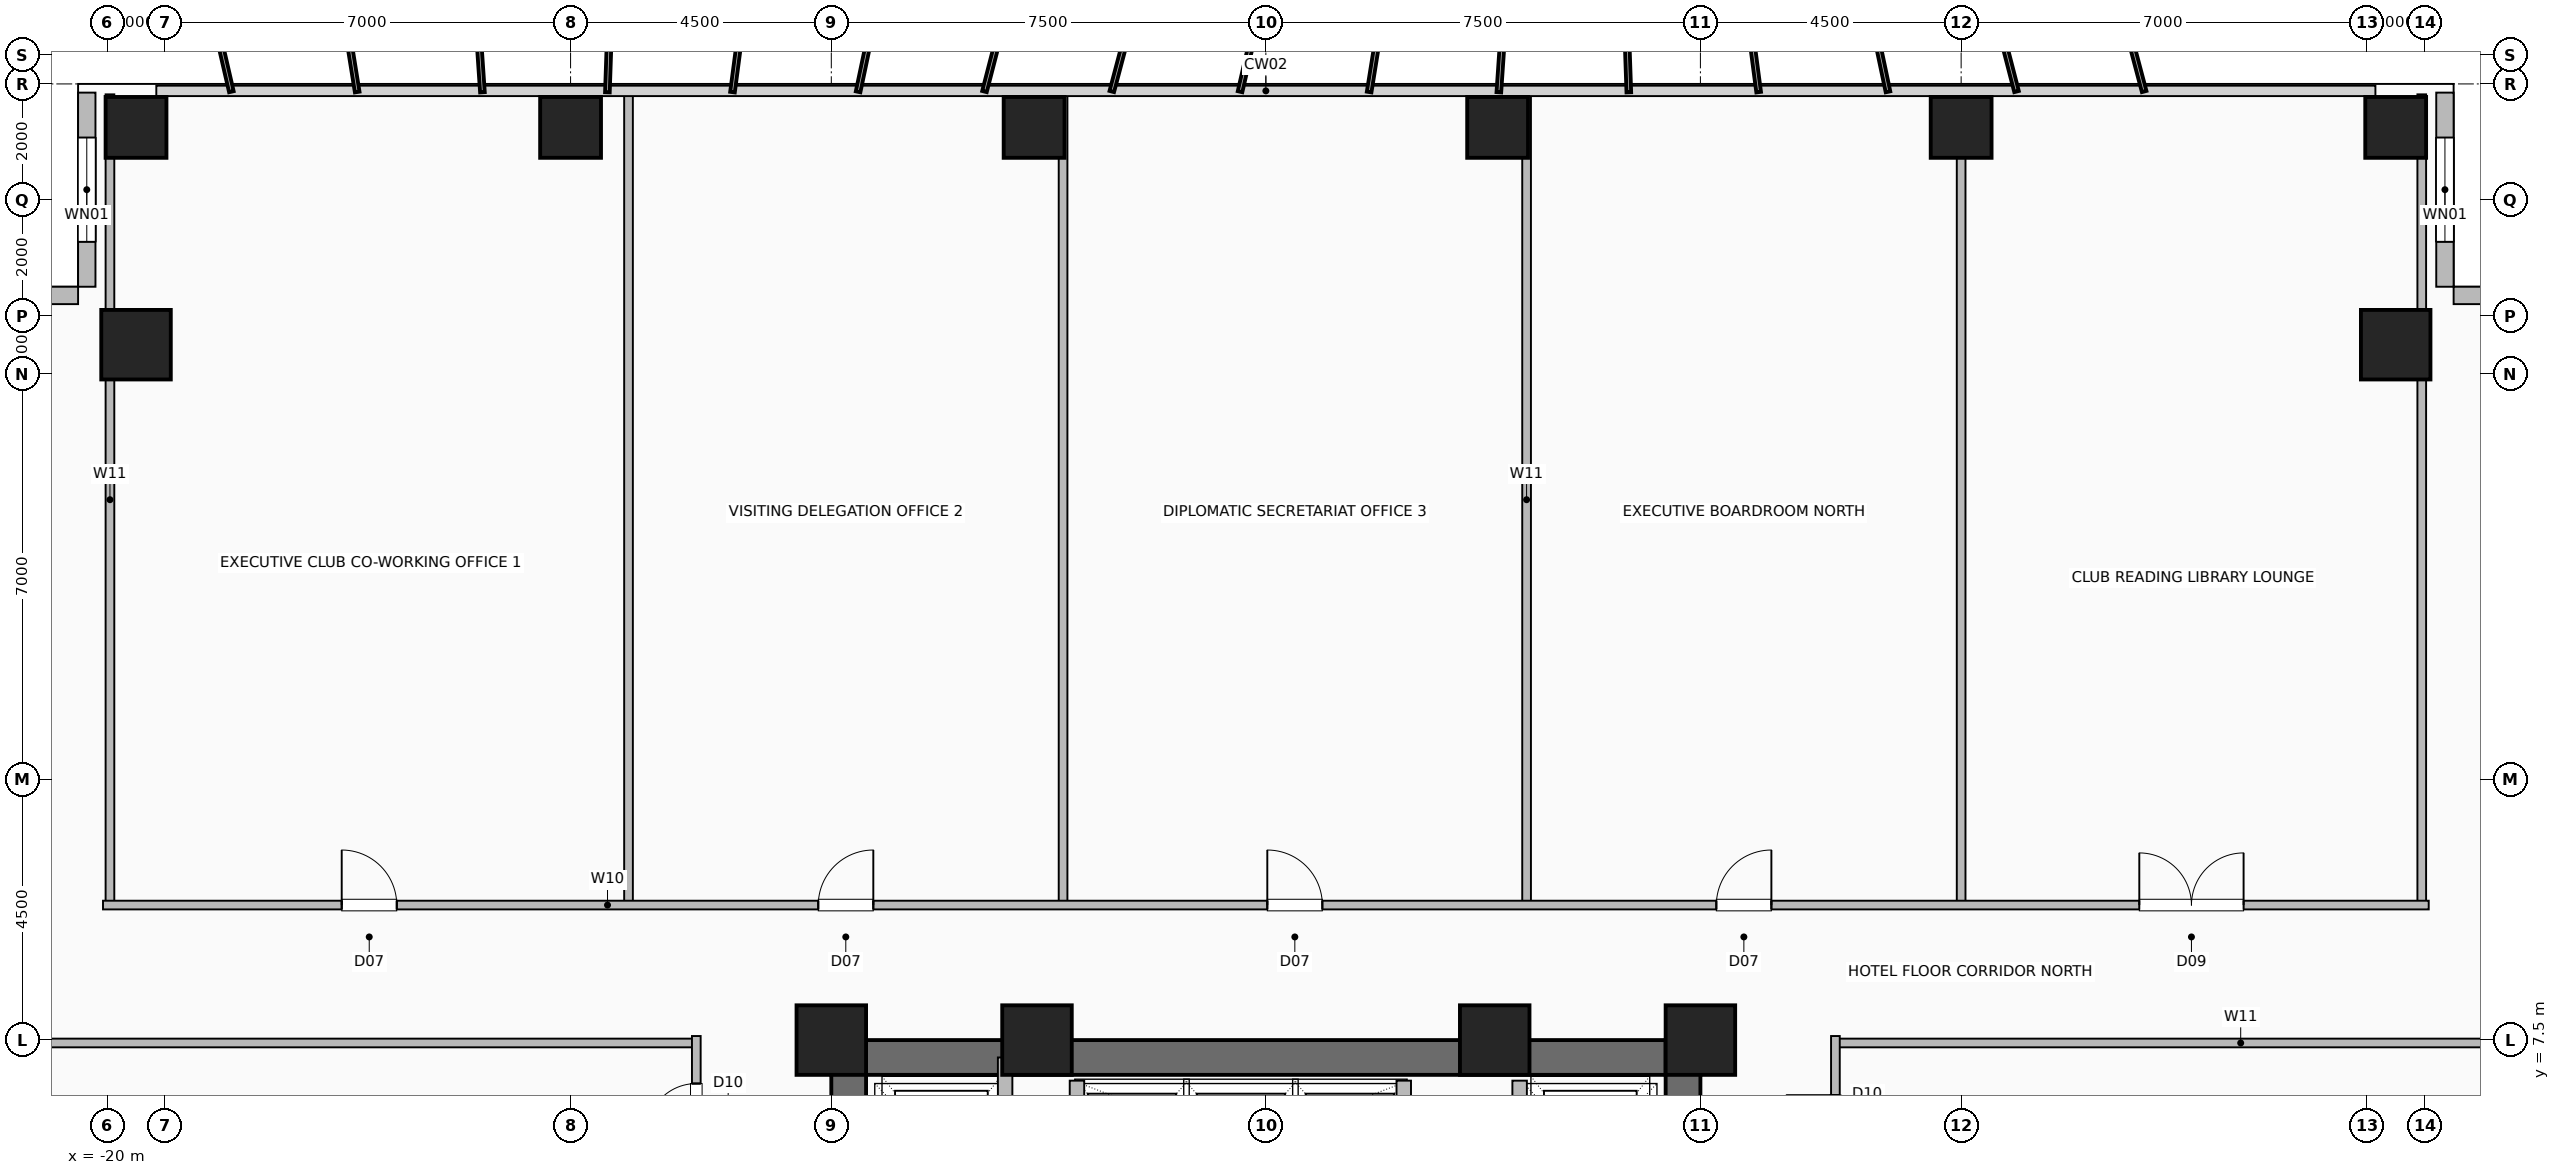
"""IFC4 building model, lengths in metres.
Left out: names, types, materials, properties, quantities, classifications, styles, units other than length and angle.
Written with IfcOpenShell. Run it as: python <this file> out.ifc"""

import sys

from ifc_helpers import new_model, si_unit, direction, frame, frame_2d, origin, origin_2d, place, context, subcontext, project, spatial, rectangle, hollow_rectangle, extrude, element, fill, save


model = new_model("IFC4")
c1 = context("Model", 3, precision=1e-05, world=origin(), true_north=direction((0.0, 1.0)))
c2 = subcontext(c1, "Body", "Model", "MODEL_VIEW")
j1 = project(units=[si_unit("LENGTHUNIT", "METRE"), si_unit("PLANEANGLEUNIT", "RADIAN")], contexts=[c1])
p1 = place(None, origin())
s1 = spatial("IfcSite", under=j1, at=p1, CompositionType="ELEMENT")
p2 = place(p1, origin())
s2 = spatial("IfcBuilding", under=s1, at=p2, CompositionType="ELEMENT")
p3 = place(p2, frame((0.0, 0.0, 58.5)))
s3 = spatial("IfcBuildingStorey", under=s2, at=p3, CompositionType="ELEMENT", Elevation=58.5)
for number, where, z_axis, x_axis in (
    (1, (7.5, 7.5, 0.0), (0.0, 0.0, 1.0), (1.0, 0.0, 0.0)),
    (2, (3.95, 7.5, 0.0), (0.0, 0.0, 1.0), (1.0, 0.0, 0.0)),
    (3, (-3.95, 7.5, 0.0), (0.0, 0.0, 1.0), (1.0, 0.0, 0.0)),
    (4, (-7.5, 7.5, 0.0), (0.0, 0.0, 1.0), (1.0, 0.0, 0.0)),
):
    element("IfcColumn", number, at=place(p3, frame(where, z_axis=z_axis, x_axis=x_axis)), inside=s3, PredefinedType="COLUMN", context=c2, shape_type="SweptSolid", body=[
        extrude(hollow_rectangle(XDim=1.2, YDim=1.2, WallThickness=0.055, at=origin_2d()), origin(), (0.0, 0.0, 1.0), 3.5),
    ])
for number, where, z_axis, x_axis in (
    (5, (-19.5, 23.25, 0.0), (0.0, 0.0, 1.0), (1.0, 0.0, 0.0)),
    (6, (-12.0, 23.25, 0.0), (0.0, 0.0, 1.0), (1.0, 0.0, 0.0)),
    (7, (-4.0, 23.25, 0.0), (0.0, 0.0, 1.0), (1.0, 0.0, 0.0)),
    (8, (4.0, 23.25, 0.0), (0.0, 0.0, 1.0), (1.0, 0.0, 0.0)),
    (9, (12.0, 23.25, 0.0), (0.0, 0.0, 1.0), (1.0, 0.0, 0.0)),
    (10, (19.5, 23.25, 0.0), (0.0, 0.0, 1.0), (1.0, 0.0, 0.0)),
):
    element("IfcColumn", number, at=place(p3, frame(where, z_axis=z_axis, x_axis=x_axis)), inside=s3, PredefinedType="COLUMN", context=c2, shape_type="SweptSolid", body=[
        extrude(hollow_rectangle(XDim=1.05, YDim=1.05, WallThickness=0.05, at=origin_2d()), origin(), (0.0, 0.0, 1.0), 3.5),
    ])
for number, where, z_axis, x_axis in (
    (11, (19.5, 19.5, 0.0), (0.0, 0.0, 1.0), (1.0, 0.0, 0.0)),
    (12, (-19.5, 19.5, 0.0), (0.0, 0.0, 1.0), (1.0, 0.0, 0.0)),
):
    element("IfcColumn", number, at=place(p3, frame(where, z_axis=z_axis, x_axis=x_axis)), inside=s3, PredefinedType="COLUMN", context=c2, shape_type="SweptSolid", body=[
        extrude(hollow_rectangle(XDim=1.2, YDim=1.2, WallThickness=0.055, at=origin_2d()), origin(), (0.0, 0.0, 1.0), 3.5),
    ])
p4 = place(p3, frame((20.35, 23.85, 0.0), z_axis=(0.0, 0.0, 1.0), x_axis=(0.0, -1.0, 0.0)))
e13 = element("IfcWall", 13, at=p4, inside=s3, PredefinedType="SOLIDWALL", context=c2, shape_type="SweptSolid", body=[
    extrude(rectangle(XDim=3.35, YDim=0.3, at=frame_2d((1.675, 0.0))), origin(), (0.0, 0.0, 1.0), 3.25),
])
p5 = place(p4, frame((0.775, 0.0, 0.9)))
e14 = element("IfcOpeningElement", 14, at=p5, cuts=e13, PredefinedType="OPENING", context=c2, shape_type="SweptSolid", body=[
    extrude(rectangle(XDim=1.8, YDim=1.8, at=frame_2d((0.9, 0.9))), frame((0.0, 0.16, 0.0), z_axis=(0.0, -1.0, 0.0), x_axis=(1.0, 0.0, 0.0)), (0.0, 0.0, 1.0), 0.32),
])
p6 = place(p3, frame((23.85, 20.35, 0.0), z_axis=(0.0, 0.0, 1.0), x_axis=(-1.0, 0.0, 0.0)))
e15 = element("IfcWall", 15, at=p6, inside=s3, PredefinedType="SOLIDWALL", context=c2, shape_type="SweptSolid", body=[
    extrude(rectangle(XDim=3.35, YDim=0.3, at=frame_2d((1.675, 0.0))), origin(), (0.0, 0.0, 1.0), 3.25),
])
p7 = place(p3, frame((-20.35, 23.85, 0.0), z_axis=(0.0, 0.0, 1.0), x_axis=(0.0, -1.0, 0.0)))
e16 = element("IfcWall", 16, at=p7, inside=s3, PredefinedType="SOLIDWALL", context=c2, shape_type="SweptSolid", body=[
    extrude(rectangle(XDim=3.35, YDim=0.3, at=frame_2d((1.675, 0.0))), origin(), (0.0, 0.0, 1.0), 3.25),
])
p8 = place(p7, frame((0.775, 0.0, 0.9)))
e17 = element("IfcOpeningElement", 17, at=p8, cuts=e16, PredefinedType="OPENING", context=c2, shape_type="SweptSolid", body=[
    extrude(rectangle(XDim=1.8, YDim=1.8, at=frame_2d((0.9, 0.9))), frame((0.0, 0.16, 0.0), z_axis=(0.0, -1.0, 0.0), x_axis=(1.0, 0.0, 0.0)), (0.0, 0.0, 1.0), 0.32),
])
p9 = place(p3, frame((-23.85, 20.35, 0.0), z_axis=(0.0, 0.0, 1.0), x_axis=(1.0, 0.0, 0.0)))
e18 = element("IfcWall", 18, at=p9, inside=s3, PredefinedType="SOLIDWALL", context=c2, shape_type="SweptSolid", body=[
    extrude(rectangle(XDim=3.35, YDim=0.3, at=frame_2d((1.675, 0.0))), origin(), (0.0, 0.0, 1.0), 3.25),
])
p10 = place(p3, frame((-7.5, 7.2, 0.0), z_axis=(0.0, 0.0, 1.0), x_axis=(1.0, 0.0, 0.0)))
e19 = element("IfcWall", 19, at=p10, inside=s3, PredefinedType="SHEAR", context=c2, shape_type="SweptSolid", body=[
    extrude(rectangle(XDim=15.0, YDim=0.6, at=frame_2d((7.5, 0.0))), origin(), (0.0, 0.0, 1.0), 3.25),
])
p11 = place(p3, frame((-7.2, -7.5, 0.0), z_axis=(0.0, 0.0, 1.0), x_axis=(0.0, 1.0, 0.0)))
e20 = element("IfcWall", 20, at=p11, inside=s3, PredefinedType="SHEAR", context=c2, shape_type="SweptSolid", body=[
    extrude(rectangle(XDim=15.0, YDim=0.6, at=frame_2d((7.5, 0.0))), origin(), (0.0, 0.0, 1.0), 3.25),
])
p12 = place(p11, frame((9.5, 0.0, 0.0)))
e21 = element("IfcOpeningElement", 21, at=p12, cuts=e20, PredefinedType="OPENING", context=c2, shape_type="SweptSolid", body=[
    extrude(rectangle(XDim=1.0, YDim=2.08, at=frame_2d((0.5, 1.04))), frame((0.0, 0.31, 0.0), z_axis=(0.0, -1.0, 0.0), x_axis=(1.0, 0.0, 0.0)), (0.0, 0.0, 1.0), 0.62),
])
p13 = place(p3, frame((7.2, -7.5, 0.0), z_axis=(0.0, 0.0, 1.0), x_axis=(0.0, 1.0, 0.0)))
e22 = element("IfcWall", 22, at=p13, inside=s3, PredefinedType="SHEAR", context=c2, shape_type="SweptSolid", body=[
    extrude(rectangle(XDim=15.0, YDim=0.6, at=frame_2d((7.5, 0.0))), origin(), (0.0, 0.0, 1.0), 3.25),
])
for number, where, z_axis, x_axis in (
    (23, (-3.26, 4.58, 0.0), (0.0, 0.0, 1.0), (0.0, 1.0, 0.0)),
    (24, (2.38, 4.58, 0.0), (0.0, 0.0, 1.0), (0.0, 1.0, 0.0)),
):
    element("IfcWall", number, at=place(p3, frame(where, z_axis=z_axis, x_axis=x_axis)), inside=s3, PredefinedType="SHEAR", context=c2, shape_type="SweptSolid", body=[
        extrude(rectangle(XDim=2.22, YDim=0.25, at=frame_2d((1.11, 0.0))), origin(), (0.0, 0.0, 1.0), 3.25),
    ])
p14 = place(p3, frame((-4.5, 4.35, 0.0), z_axis=(0.0, 0.0, 1.0), x_axis=(0.0, 1.0, 0.0)))
e25 = element("IfcWall", 25, at=p14, inside=s3, PredefinedType="SHEAR", context=c2, shape_type="SweptSolid", body=[
    extrude(rectangle(XDim=2.85, YDim=0.25, at=frame_2d((1.425, 0.0))), origin(), (0.0, 0.0, 1.0), 3.25),
])
p15 = place(p3, frame((4.38, 4.3, 0.0), z_axis=(0.0, 0.0, 1.0), x_axis=(0.0, 1.0, 0.0)))
e26 = element("IfcWall", 26, at=p15, inside=s3, PredefinedType="SHEAR", context=c2, shape_type="SweptSolid", body=[
    extrude(rectangle(XDim=2.5, YDim=0.25, at=frame_2d((1.25, 0.0))), origin(), (0.0, 0.0, 1.0), 3.25),
])
p16 = place(p15, frame((0.8, 0.0, 0.0)))
e27 = element("IfcOpeningElement", 27, at=p16, cuts=e26, PredefinedType="OPENING", context=c2, shape_type="SweptSolid", body=[
    extrude(rectangle(XDim=1.2, YDim=2.2, at=frame_2d((0.6, 1.1))), frame((0.0, 0.135, 0.0), z_axis=(0.0, -1.0, 0.0), x_axis=(1.0, 0.0, 0.0)), (0.0, 0.0, 1.0), 0.27),
])
for number, where, z_axis, x_axis in (
    (28, (-19.95, 9.83, 0.0), (0.0, 0.0, 1.0), (0.0, 1.0, 0.0)),
    (29, (-11.0, 9.83, 0.0), (0.0, 0.0, 1.0), (0.0, 1.0, 0.0)),
    (30, (-3.5, 9.83, 0.0), (0.0, 0.0, 1.0), (0.0, 1.0, 0.0)),
    (31, (4.5, 9.83, 0.0), (0.0, 0.0, 1.0), (0.0, 1.0, 0.0)),
    (32, (12.0, 9.83, 0.0), (0.0, 0.0, 1.0), (0.0, 1.0, 0.0)),
    (33, (19.95, 9.83, 0.0), (0.0, 0.0, 1.0), (0.0, 1.0, 0.0)),
):
    element("IfcWall", number, at=place(p3, frame(where, z_axis=z_axis, x_axis=x_axis)), inside=s3, PredefinedType="PARTITIONING", context=c2, shape_type="SweptSolid", body=[
        extrude(rectangle(XDim=13.99, YDim=0.15, at=frame_2d((6.995, 0.0))), origin(), (0.0, 0.0, 1.0), 3.25),
    ])
p17 = place(p3, frame((-20.07, 9.83, 0.0), z_axis=(0.0, 0.0, 1.0), x_axis=(1.0, 0.0, 0.0)))
e34 = element("IfcWall", 34, at=p17, inside=s3, PredefinedType="PARTITIONING", context=c2, shape_type="SweptSolid", body=[
    extrude(rectangle(XDim=40.14, YDim=0.15, at=frame_2d((20.07, 0.0))), origin(), (0.0, 0.0, 1.0), 3.25),
])
p18 = place(p17, frame((4.12, 0.0, 0.0)))
e35 = element("IfcOpeningElement", 35, at=p18, cuts=e34, PredefinedType="OPENING", context=c2, shape_type="SweptSolid", body=[
    extrude(rectangle(XDim=0.95, YDim=2.06, at=frame_2d((0.475, 1.03))), frame((0.0, 0.085, 0.0), z_axis=(0.0, -1.0, 0.0), x_axis=(1.0, 0.0, 0.0)), (0.0, 0.0, 1.0), 0.17),
])
p19 = place(p17, frame((12.345, 0.0, 0.0)))
e36 = element("IfcOpeningElement", 36, at=p19, cuts=e34, PredefinedType="OPENING", context=c2, shape_type="SweptSolid", body=[
    extrude(rectangle(XDim=0.95, YDim=2.06, at=frame_2d((0.475, 1.03))), frame((0.0, 0.085, 0.0), z_axis=(0.0, -1.0, 0.0), x_axis=(1.0, 0.0, 0.0)), (0.0, 0.0, 1.0), 0.17),
])
p20 = place(p17, frame((20.095, 0.0, 0.0)))
e37 = element("IfcOpeningElement", 37, at=p20, cuts=e34, PredefinedType="OPENING", context=c2, shape_type="SweptSolid", body=[
    extrude(rectangle(XDim=0.95, YDim=2.06, at=frame_2d((0.475, 1.03))), frame((0.0, 0.085, 0.0), z_axis=(0.0, -1.0, 0.0), x_axis=(1.0, 0.0, 0.0)), (0.0, 0.0, 1.0), 0.17),
])
p21 = place(p17, frame((27.845, 0.0, 0.0)))
e38 = element("IfcOpeningElement", 38, at=p21, cuts=e34, PredefinedType="OPENING", context=c2, shape_type="SweptSolid", body=[
    extrude(rectangle(XDim=0.95, YDim=2.06, at=frame_2d((0.475, 1.03))), frame((0.0, 0.085, 0.0), z_axis=(0.0, -1.0, 0.0), x_axis=(1.0, 0.0, 0.0)), (0.0, 0.0, 1.0), 0.17),
])
p22 = place(p17, frame((35.145, 0.0, 0.0)))
e39 = element("IfcOpeningElement", 39, at=p22, cuts=e34, PredefinedType="OPENING", context=c2, shape_type="SweptSolid", body=[
    extrude(rectangle(XDim=1.8, YDim=2.08, at=frame_2d((0.9, 1.04))), frame((0.0, 0.085, 0.0), z_axis=(0.0, -1.0, 0.0), x_axis=(1.0, 0.0, 0.0)), (0.0, 0.0, 1.0), 0.17),
])
p23 = place(p3, frame((-23.82, 7.45, 0.0), z_axis=(0.0, 0.0, 1.0), x_axis=(1.0, 0.0, 0.0)))
e40 = element("IfcWall", 40, at=p23, inside=s3, PredefinedType="PARTITIONING", context=c2, shape_type="SweptSolid", body=[
    extrude(rectangle(XDim=13.99, YDim=0.15, at=frame_2d((6.995, 0.0))), origin(), (0.0, 0.0, 1.0), 3.25),
])
p24 = place(p3, frame((-9.83, -7.57, 0.0), z_axis=(0.0, 0.0, 1.0), x_axis=(0.0, 1.0, 0.0)))
e41 = element("IfcWall", 41, at=p24, inside=s3, PredefinedType="PARTITIONING", context=c2, shape_type="SweptSolid", body=[
    extrude(rectangle(XDim=15.14, YDim=0.15, at=frame_2d((7.57, 0.0))), origin(), (0.0, 0.0, 1.0), 3.25),
])
p25 = place(p24, frame((2.62, 0.0, 0.0)))
e42 = element("IfcOpeningElement", 42, at=p25, cuts=e41, PredefinedType="OPENING", context=c2, shape_type="SweptSolid", body=[
    extrude(rectangle(XDim=0.95, YDim=2.06, at=frame_2d((0.475, 1.03))), frame((0.0, 0.085, 0.0), z_axis=(0.0, -1.0, 0.0), x_axis=(1.0, 0.0, 0.0)), (0.0, 0.0, 1.0), 0.17),
])
p26 = place(p24, frame((8.945, 0.0, 0.0)))
e43 = element("IfcOpeningElement", 43, at=p26, cuts=e41, PredefinedType="OPENING", context=c2, shape_type="SweptSolid", body=[
    extrude(rectangle(XDim=0.95, YDim=2.06, at=frame_2d((0.475, 1.03))), frame((0.0, 0.085, 0.0), z_axis=(0.0, -1.0, 0.0), x_axis=(1.0, 0.0, 0.0)), (0.0, 0.0, 1.0), 0.17),
])
p27 = place(p24, frame((13.47, 0.0, 0.0)))
e44 = element("IfcOpeningElement", 44, at=p27, cuts=e41, PredefinedType="OPENING", context=c2, shape_type="SweptSolid", body=[
    extrude(rectangle(XDim=0.85, YDim=2.05, at=frame_2d((0.425, 1.025))), frame((0.0, 0.085, 0.0), z_axis=(0.0, -1.0, 0.0), x_axis=(1.0, 0.0, 0.0)), (0.0, 0.0, 1.0), 0.17),
])
p28 = place(p3, frame((9.83, 7.45, 0.0), z_axis=(0.0, 0.0, 1.0), x_axis=(1.0, 0.0, 0.0)))
e45 = element("IfcWall", 45, at=p28, inside=s3, PredefinedType="PARTITIONING", context=c2, shape_type="SweptSolid", body=[
    extrude(rectangle(XDim=13.99, YDim=0.15, at=frame_2d((6.995, 0.0))), origin(), (0.0, 0.0, 1.0), 3.25),
])
p29 = place(p3, frame((9.83, -7.57, 0.0), z_axis=(0.0, 0.0, 1.0), x_axis=(0.0, 1.0, 0.0)))
e46 = element("IfcWall", 46, at=p29, inside=s3, PredefinedType="PARTITIONING", context=c2, shape_type="SweptSolid", body=[
    extrude(rectangle(XDim=15.14, YDim=0.15, at=frame_2d((7.57, 0.0))), origin(), (0.0, 0.0, 1.0), 3.25),
])
p30 = place(p29, frame((2.62, 0.0, 0.0)))
e47 = element("IfcOpeningElement", 47, at=p30, cuts=e46, PredefinedType="OPENING", context=c2, shape_type="SweptSolid", body=[
    extrude(rectangle(XDim=0.95, YDim=2.06, at=frame_2d((0.475, 1.03))), frame((0.0, 0.085, 0.0), z_axis=(0.0, -1.0, 0.0), x_axis=(1.0, 0.0, 0.0)), (0.0, 0.0, 1.0), 0.17),
])
p31 = place(p29, frame((8.745, 0.0, 0.0)))
e48 = element("IfcOpeningElement", 48, at=p31, cuts=e46, PredefinedType="OPENING", context=c2, shape_type="SweptSolid", body=[
    extrude(rectangle(XDim=0.95, YDim=2.06, at=frame_2d((0.475, 1.03))), frame((0.0, 0.085, 0.0), z_axis=(0.0, -1.0, 0.0), x_axis=(1.0, 0.0, 0.0)), (0.0, 0.0, 1.0), 0.17),
])
p32 = place(p29, frame((13.27, 0.0, 0.0)))
e49 = element("IfcOpeningElement", 49, at=p32, cuts=e46, PredefinedType="OPENING", context=c2, shape_type="SweptSolid", body=[
    extrude(rectangle(XDim=0.85, YDim=2.05, at=frame_2d((0.425, 1.025))), frame((0.0, 0.085, 0.0), z_axis=(0.0, -1.0, 0.0), x_axis=(1.0, 0.0, 0.0)), (0.0, 0.0, 1.0), 0.17),
])
p33 = place(p5, origin())
e50 = element("IfcWindow", 50, at=p33, inside=s3, PartitioningType="SINGLE_PANEL", PredefinedType="WINDOW", context=c2, shape_type="SweptSolid", body=[
    extrude(rectangle(XDim=1.8, YDim=1.8, at=frame_2d((0.9, 0.9))), frame((0.0, 0.03, 0.0), z_axis=(0.0, -1.0, 0.0), x_axis=(1.0, 0.0, 0.0)), (0.0, 0.0, 1.0), 0.06),
])
fill(e14, e50)
p34 = place(p8, origin())
e51 = element("IfcWindow", 51, at=p34, inside=s3, PartitioningType="SINGLE_PANEL", PredefinedType="WINDOW", context=c2, shape_type="SweptSolid", body=[
    extrude(rectangle(XDim=1.8, YDim=1.8, at=frame_2d((0.9, 0.9))), frame((0.0, 0.03, 0.0), z_axis=(0.0, -1.0, 0.0), x_axis=(1.0, 0.0, 0.0)), (0.0, 0.0, 1.0), 0.06),
])
fill(e17, e51)
p35 = place(p18, origin())
e52 = element("IfcDoor", 52, at=p35, inside=s3, OperationType="SINGLE_SWING_LEFT", PredefinedType="DOOR", context=c2, shape_type="SweptSolid", body=[
    extrude(rectangle(XDim=0.95, YDim=2.06, at=frame_2d((0.475, 1.03))), frame((0.0, 0.025, 0.0), z_axis=(0.0, -1.0, 0.0), x_axis=(1.0, 0.0, 0.0)), (0.0, 0.0, 1.0), 0.05),
])
fill(e35, e52)
p36 = place(p19, origin())
e53 = element("IfcDoor", 53, at=p36, inside=s3, OperationType="SINGLE_SWING_RIGHT", PredefinedType="DOOR", context=c2, shape_type="SweptSolid", body=[
    extrude(rectangle(XDim=0.95, YDim=2.06, at=frame_2d((0.475, 1.03))), frame((0.0, 0.025, 0.0), z_axis=(0.0, -1.0, 0.0), x_axis=(1.0, 0.0, 0.0)), (0.0, 0.0, 1.0), 0.05),
])
fill(e36, e53)
p37 = place(p20, origin())
e54 = element("IfcDoor", 54, at=p37, inside=s3, OperationType="SINGLE_SWING_LEFT", PredefinedType="DOOR", context=c2, shape_type="SweptSolid", body=[
    extrude(rectangle(XDim=0.95, YDim=2.06, at=frame_2d((0.475, 1.03))), frame((0.0, 0.025, 0.0), z_axis=(0.0, -1.0, 0.0), x_axis=(1.0, 0.0, 0.0)), (0.0, 0.0, 1.0), 0.05),
])
fill(e37, e54)
p38 = place(p21, origin())
e55 = element("IfcDoor", 55, at=p38, inside=s3, OperationType="SINGLE_SWING_RIGHT", PredefinedType="DOOR", context=c2, shape_type="SweptSolid", body=[
    extrude(rectangle(XDim=0.95, YDim=2.06, at=frame_2d((0.475, 1.03))), frame((0.0, 0.025, 0.0), z_axis=(0.0, -1.0, 0.0), x_axis=(1.0, 0.0, 0.0)), (0.0, 0.0, 1.0), 0.05),
])
fill(e38, e55)
p39 = place(p22, origin())
e56 = element("IfcDoor", 56, at=p39, inside=s3, OperationType="DOUBLE_DOOR_SINGLE_SWING", PredefinedType="DOOR", context=c2, shape_type="SweptSolid", body=[
    extrude(rectangle(XDim=1.8, YDim=2.08, at=frame_2d((0.9, 1.04))), frame((0.0, 0.025, 0.0), z_axis=(0.0, -1.0, 0.0), x_axis=(1.0, 0.0, 0.0)), (0.0, 0.0, 1.0), 0.05),
])
fill(e39, e56)
p40 = place(p27, origin())
e57 = element("IfcDoor", 57, at=p40, inside=s3, OperationType="SINGLE_SWING_LEFT", PredefinedType="DOOR", context=c2, shape_type="SweptSolid", body=[
    extrude(rectangle(XDim=0.85, YDim=2.05, at=frame_2d((0.425, 1.025))), frame((0.0, 0.025, 0.0), z_axis=(0.0, -1.0, 0.0), x_axis=(1.0, 0.0, 0.0)), (0.0, 0.0, 1.0), 0.05),
])
fill(e44, e57)
save(model, sys.argv[1])
